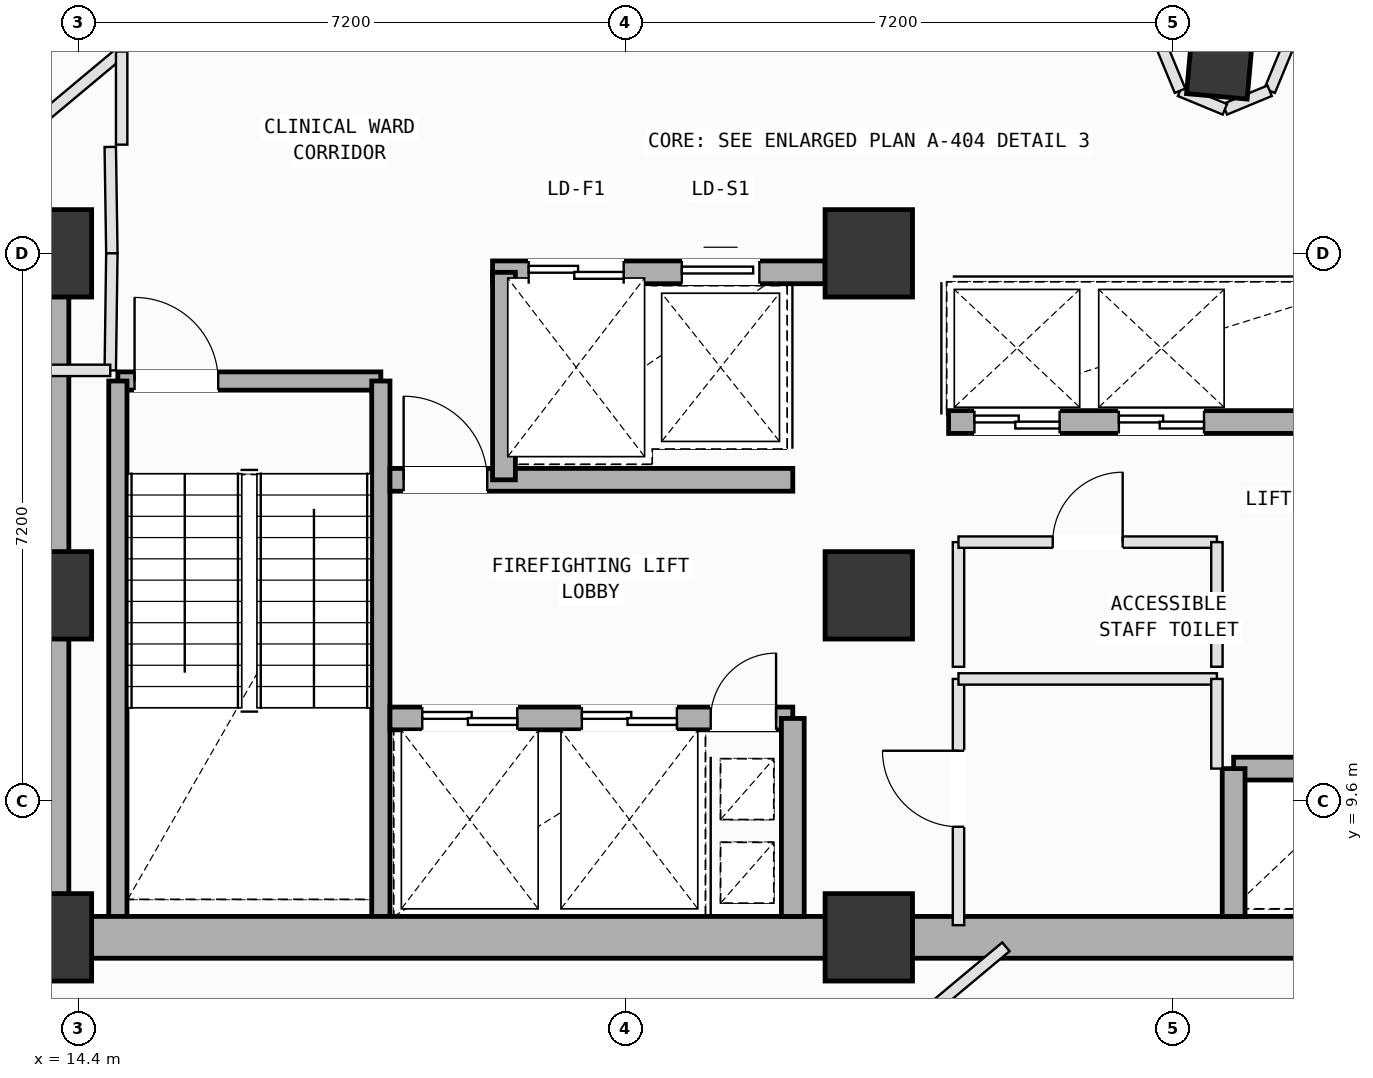
"""IFC4 building model, lengths in metres.
Left out: names, types, materials, properties, quantities, classifications, styles, units other than length and angle.
Written with IfcOpenShell. Run it as: python <this file> out.ifc"""

import sys

from ifc_helpers import new_model, si_unit, direction, frame, frame_2d, origin, origin_2d, place, context, subcontext, project, spatial, rectangle, extrude, element, fill, save


model = new_model("IFC4")
c1 = context("Model", 3, precision=1e-05, world=origin(), true_north=direction((0.0, 1.0)))
c2 = subcontext(c1, "Body", "Model", "MODEL_VIEW")
j1 = project(units=[si_unit("LENGTHUNIT", "METRE"), si_unit("PLANEANGLEUNIT", "RADIAN")], contexts=[c1])
p1 = place(None, origin())
s1 = spatial("IfcSite", under=j1, at=p1, CompositionType="ELEMENT")
p2 = place(p1, origin())
s2 = spatial("IfcBuilding", under=s1, at=p2, CompositionType="ELEMENT")
p3 = place(p2, frame((0.0, 0.0, 193.8)))
s3 = spatial("IfcBuildingStorey", under=s2, at=p3, CompositionType="ELEMENT", Elevation=193.8)
for number, where, z_axis, x_axis in (
    (1, (14.0, 7.8, 0.0), (0.0, 0.0, 1.0), (1.0, 0.0, 0.0)),
    (2, (14.0, 12.3, 0.0), (0.0, 0.0, 1.0), (1.0, 0.0, 0.0)),
    (3, (14.0, 16.8, 0.0), (0.0, 0.0, 1.0), (1.0, 0.0, 0.0)),
    (4, (24.8, 7.8, 0.0), (0.0, 0.0, 1.0), (1.0, 0.0, 0.0)),
    (5, (24.8, 12.3, 0.0), (0.0, 0.0, 1.0), (1.0, 0.0, 0.0)),
    (6, (24.8, 16.8, 0.0), (0.0, 0.0, 1.0), (1.0, 0.0, 0.0)),
):
    element("IfcColumn", number, at=place(p3, frame(where, z_axis=z_axis, x_axis=x_axis)), inside=s3, PredefinedType="COLUMN", context=c2, shape_type="SweptSolid", body=[
        extrude(rectangle(XDim=1.15, YDim=1.15, at=origin_2d()), origin(), (0.0, 0.0, 1.0), 4.0),
    ])
p4 = place(p3, frame((29.441, 19.563, 0.002), z_axis=(0.021801167922, -0.017037887535, 0.999617136441), x_axis=(-0.729765502986, 0.68314184463, 0.027559585755)))
e7 = element("IfcColumn", 7, at=p4, inside=s3, PredefinedType="COLUMN", context=c2, shape_type="SweptSolid", body=[
    extrude(rectangle(XDim=1.4, YDim=0.8, at=origin_2d()), origin(), (0.0, 0.0, 1.0), 3.998),
])
p5 = place(p3, frame((16.476, 2.487, 0.0), z_axis=(0.0, 0.0, 1.0), x_axis=(-0.641449443944, 0.767165308694, 0.0)))
e8 = element("IfcWall", 8, at=p5, inside=s3, PredefinedType="SOLIDWALL", context=c2, shape_type="SweptSolid", body=[
    extrude(rectangle(XDim=7.36, YDim=0.28, at=frame_2d((3.68, 0.0))), origin(), (0.0, 0.0, 1.0), 3.265),
])
p6 = place(p5, frame((1.888, 0.0, 0.75)))
e9 = element("IfcOpeningElement", 9, at=p6, cuts=e8, PredefinedType="OPENING", context=c2, shape_type="SweptSolid", body=[
    extrude(rectangle(XDim=1.8, YDim=2.05, at=frame_2d((0.9, 1.025))), frame((0.0, 0.15, 0.0), z_axis=(0.0, -1.0, 0.0), x_axis=(1.0, 0.0, 0.0)), (0.0, 0.0, 1.0), 0.3),
])
p7 = place(p3, frame((14.92, 15.12, 0.0), z_axis=(0.0, 0.0, 1.0), x_axis=(1.0, 0.0, 0.0)))
e10 = element("IfcWall", 10, at=p7, inside=s3, PredefinedType="SOLIDWALL", context=c2, shape_type="SweptSolid", body=[
    extrude(rectangle(XDim=3.46, YDim=0.24, at=frame_2d((1.73, 0.0))), origin(), (0.0, 0.0, 1.0), 3.78),
])
p8 = place(p7, frame((0.22, 0.0, 0.0)))
e11 = element("IfcOpeningElement", 11, at=p8, cuts=e10, PredefinedType="OPENING", context=c2, shape_type="SweptSolid", body=[
    extrude(rectangle(XDim=1.1, YDim=2.15, at=frame_2d((0.55, 1.075))), frame((0.0, 0.13, 0.0), z_axis=(0.0, -1.0, 0.0), x_axis=(1.0, 0.0, 0.0)), (0.0, 0.0, 1.0), 0.26),
])
for number, where, z_axis, x_axis in (
    (12, (18.38, 15.12, 0.0), (0.0, 0.0, 1.0), (0.0, -1.0, 0.0)),
    (13, (14.92, 8.075, 0.0), (0.0, 0.0, 1.0), (0.0, 1.0, 0.0)),
):
    element("IfcWall", number, at=place(p3, frame(where, z_axis=z_axis, x_axis=x_axis)), inside=s3, PredefinedType="SOLIDWALL", context=c2, shape_type="SweptSolid", body=[
        extrude(rectangle(XDim=7.045, YDim=0.24, at=frame_2d((3.522, 0.0))), origin(), (0.0, 0.0, 1.0), 3.78),
    ])
for number, where, z_axis, x_axis in (
    (14, (14.0, 7.8, 0.0), (0.0, 0.0, 1.0), (1.0, 0.0, 0.0)),
    (15, (24.8, 7.8, 0.0), (0.0, 0.0, 1.0), (1.0, 0.0, 0.0)),
):
    element("IfcWall", number, at=place(p3, frame(where, z_axis=z_axis, x_axis=x_axis)), inside=s3, PredefinedType="SHEAR", context=c2, shape_type="SweptSolid", body=[
        extrude(rectangle(XDim=10.8, YDim=0.55, at=frame_2d((5.4, 0.0))), origin(), (0.0, 0.0, 1.0), 3.78),
    ])
p9 = place(p3, frame((14.0, 16.8, 0.0), z_axis=(0.0, 0.0, 1.0), x_axis=(0.0, -1.0, 0.0)))
e16 = element("IfcWall", 16, at=p9, inside=s3, PredefinedType="SHEAR", context=c2, shape_type="SweptSolid", body=[
    extrude(rectangle(XDim=9.0, YDim=0.55, at=frame_2d((4.5, 0.0))), origin(), (0.0, 0.0, 1.0), 3.78),
])
p10 = place(p3, frame((19.85, 16.55, 0.0), z_axis=(0.0, 0.0, 1.0), x_axis=(1.0, 0.0, 0.0)))
e17 = element("IfcWall", 17, at=p10, inside=s3, PredefinedType="SOLIDWALL", context=c2, shape_type="SweptSolid", body=[
    extrude(rectangle(XDim=4.375, YDim=0.3, at=frame_2d((2.188, 0.0))), origin(), (0.0, 0.0, 1.0), 3.78),
])
p11 = place(p10, frame((0.475, 0.0, 0.0)))
e18 = element("IfcOpeningElement", 18, at=p11, cuts=e17, PredefinedType="OPENING", context=c2, shape_type="SweptSolid", body=[
    extrude(rectangle(XDim=1.25, YDim=2.18, at=frame_2d((0.625, 1.09))), frame((0.0, 0.16, 0.0), z_axis=(0.0, -1.0, 0.0), x_axis=(1.0, 0.0, 0.0)), (0.0, 0.0, 1.0), 0.32),
])
p12 = place(p10, frame((2.49, 0.0, 0.0)))
e19 = element("IfcOpeningElement", 19, at=p12, cuts=e17, PredefinedType="OPENING", context=c2, shape_type="SweptSolid", body=[
    extrude(rectangle(XDim=1.02, YDim=2.12, at=frame_2d((0.51, 1.06))), frame((0.0, 0.16, 0.0), z_axis=(0.0, -1.0, 0.0), x_axis=(1.0, 0.0, 0.0)), (0.0, 0.0, 1.0), 0.32),
])
p13 = place(p3, frame((18.5, 10.68, 0.0), z_axis=(0.0, 0.0, 1.0), x_axis=(1.0, 0.0, 0.0)))
e20 = element("IfcWall", 20, at=p13, inside=s3, PredefinedType="SOLIDWALL", context=c2, shape_type="SweptSolid", body=[
    extrude(rectangle(XDim=5.3, YDim=0.3, at=frame_2d((2.65, 0.0))), origin(), (0.0, 0.0, 1.0), 3.78),
])
p14 = place(p13, frame((4.22, 0.0, 0.0)))
e21 = element("IfcOpeningElement", 21, at=p14, cuts=e20, PredefinedType="OPENING", context=c2, shape_type="SweptSolid", body=[
    extrude(rectangle(XDim=0.86, YDim=2.06, at=frame_2d((0.43, 1.03))), frame((0.0, 0.16, 0.0), z_axis=(0.0, -1.0, 0.0), x_axis=(1.0, 0.0, 0.0)), (0.0, 0.0, 1.0), 0.32),
])
p15 = place(p13, frame((0.425, 0.0, 0.0)))
e22 = element("IfcOpeningElement", 22, at=p15, cuts=e20, PredefinedType="OPENING", context=c2, shape_type="SweptSolid", body=[
    extrude(rectangle(XDim=1.25, YDim=2.18, at=frame_2d((0.625, 1.09))), frame((0.0, 0.16, 0.0), z_axis=(0.0, -1.0, 0.0), x_axis=(1.0, 0.0, 0.0)), (0.0, 0.0, 1.0), 0.32),
])
p16 = place(p13, frame((2.525, 0.0, 0.0)))
e23 = element("IfcOpeningElement", 23, at=p16, cuts=e20, PredefinedType="OPENING", context=c2, shape_type="SweptSolid", body=[
    extrude(rectangle(XDim=1.25, YDim=2.18, at=frame_2d((0.625, 1.09))), frame((0.0, 0.16, 0.0), z_axis=(0.0, -1.0, 0.0), x_axis=(1.0, 0.0, 0.0)), (0.0, 0.0, 1.0), 0.32),
])
p17 = place(p3, frame((18.5, 13.82, 0.0), z_axis=(0.0, 0.0, 1.0), x_axis=(1.0, 0.0, 0.0)))
e24 = element("IfcWall", 24, at=p17, inside=s3, PredefinedType="SOLIDWALL", context=c2, shape_type="SweptSolid", body=[
    extrude(rectangle(XDim=5.3, YDim=0.3, at=frame_2d((2.65, 0.0))), origin(), (0.0, 0.0, 1.0), 3.78),
])
p18 = place(p17, frame((0.18, 0.0, 0.0)))
e25 = element("IfcOpeningElement", 25, at=p18, cuts=e24, PredefinedType="OPENING", context=c2, shape_type="SweptSolid", body=[
    extrude(rectangle(XDim=1.1, YDim=2.15, at=frame_2d((0.55, 1.075))), frame((0.0, 0.16, 0.0), z_axis=(0.0, -1.0, 0.0), x_axis=(1.0, 0.0, 0.0)), (0.0, 0.0, 1.0), 0.32),
])
p19 = place(p3, frame((23.8, 8.075, 0.0), z_axis=(0.0, 0.0, 1.0), x_axis=(0.0, 1.0, 0.0)))
e26 = element("IfcWall", 26, at=p19, inside=s3, PredefinedType="SOLIDWALL", context=c2, shape_type="SweptSolid", body=[
    extrude(rectangle(XDim=2.605, YDim=0.3, at=frame_2d((1.302, 0.0))), origin(), (0.0, 0.0, 1.0), 3.78),
])
p20 = place(p3, frame((20.0, 13.82, 0.0), z_axis=(0.0, 0.0, 1.0), x_axis=(0.0, 1.0, 0.0)))
e27 = element("IfcWall", 27, at=p20, inside=s3, PredefinedType="SOLIDWALL", context=c2, shape_type="SweptSolid", body=[
    extrude(rectangle(XDim=2.73, YDim=0.3, at=frame_2d((1.365, 0.0))), origin(), (0.0, 0.0, 1.0), 3.78),
])
p21 = place(p3, frame((29.6, 10.02, 0.0), z_axis=(0.0, 0.0, 1.0), x_axis=(1.0, 0.0, 0.0)))
e28 = element("IfcWall", 28, at=p21, inside=s3, PredefinedType="SOLIDWALL", context=c2, shape_type="SweptSolid", body=[
    extrude(rectangle(XDim=1.7, YDim=0.3, at=frame_2d((0.85, 0.0))), origin(), (0.0, 0.0, 1.0), 3.78),
])
p22 = place(p3, frame((29.6, 8.075, 0.0), z_axis=(0.0, 0.0, 1.0), x_axis=(0.0, 1.0, 0.0)))
e29 = element("IfcWall", 29, at=p22, inside=s3, PredefinedType="SOLIDWALL", context=c2, shape_type="SweptSolid", body=[
    extrude(rectangle(XDim=1.945, YDim=0.3, at=frame_2d((0.973, 0.0))), origin(), (0.0, 0.0, 1.0), 3.78),
])
p23 = place(p3, frame((25.85, 14.58, 0.0), z_axis=(0.0, 0.0, 1.0), x_axis=(1.0, 0.0, 0.0)))
e30 = element("IfcWall", 30, at=p23, inside=s3, PredefinedType="SOLIDWALL", context=c2, shape_type="SweptSolid", body=[
    extrude(rectangle(XDim=5.45, YDim=0.3, at=frame_2d((2.725, 0.0))), origin(), (0.0, 0.0, 1.0), 3.78),
])
p24 = place(p23, frame((0.34, 0.0, 0.0)))
e31 = element("IfcOpeningElement", 31, at=p24, cuts=e30, PredefinedType="OPENING", context=c2, shape_type="SweptSolid", body=[
    extrude(rectangle(XDim=1.12, YDim=2.15, at=frame_2d((0.56, 1.075))), frame((0.0, 0.16, 0.0), z_axis=(0.0, -1.0, 0.0), x_axis=(1.0, 0.0, 0.0)), (0.0, 0.0, 1.0), 0.32),
])
p25 = place(p23, frame((2.24, 0.0, 0.0)))
e32 = element("IfcOpeningElement", 32, at=p25, cuts=e30, PredefinedType="OPENING", context=c2, shape_type="SweptSolid", body=[
    extrude(rectangle(XDim=1.12, YDim=2.15, at=frame_2d((0.56, 1.075))), frame((0.0, 0.16, 0.0), z_axis=(0.0, -1.0, 0.0), x_axis=(1.0, 0.0, 0.0)), (0.0, 0.0, 1.0), 0.32),
])
p26 = place(p3, frame((25.98, 7.96, 0.0), z_axis=(0.0, 0.0, 1.0), x_axis=(0.0, 1.0, 0.0)))
e33 = element("IfcWall", 33, at=p26, inside=s3, PredefinedType="PARTITIONING", context=c2, shape_type="SweptSolid", body=[
    extrude(rectangle(XDim=3.24, YDim=0.15, at=frame_2d((1.62, 0.0))), origin(), (0.0, 0.0, 1.0), 3.78),
])
p27 = place(p26, frame((1.295, 0.0, 0.0)))
e34 = element("IfcOpeningElement", 34, at=p27, cuts=e33, PredefinedType="OPENING", context=c2, shape_type="SweptSolid", body=[
    extrude(rectangle(XDim=1.0, YDim=2.12, at=frame_2d((0.5, 1.06))), frame((0.0, 0.085, 0.0), z_axis=(0.0, -1.0, 0.0), x_axis=(1.0, 0.0, 0.0)), (0.0, 0.0, 1.0), 0.17),
])
p28 = place(p3, frame((25.98, 11.2, 0.0), z_axis=(0.0, 0.0, 1.0), x_axis=(1.0, 0.0, 0.0)))
e35 = element("IfcWall", 35, at=p28, inside=s3, PredefinedType="PARTITIONING", context=c2, shape_type="SweptSolid", body=[
    extrude(rectangle(XDim=3.4, YDim=0.15, at=frame_2d((1.7, 0.0))), origin(), (0.0, 0.0, 1.0), 3.78),
])
p29 = place(p3, frame((29.38, 11.2, 0.0), z_axis=(0.0, 0.0, 1.0), x_axis=(0.0, -1.0, 0.0)))
e36 = element("IfcWall", 36, at=p29, inside=s3, PredefinedType="PARTITIONING", context=c2, shape_type="SweptSolid", body=[
    extrude(rectangle(XDim=1.18, YDim=0.15, at=frame_2d((0.59, 0.0))), origin(), (0.0, 0.0, 1.0), 3.78),
])
p30 = place(p3, frame((25.98, 11.36, 0.0), z_axis=(0.0, 0.0, 1.0), x_axis=(0.0, 1.0, 0.0)))
e37 = element("IfcWall", 37, at=p30, inside=s3, PredefinedType="PARTITIONING", context=c2, shape_type="SweptSolid", body=[
    extrude(rectangle(XDim=1.64, YDim=0.15, at=frame_2d((0.82, 0.0))), origin(), (0.0, 0.0, 1.0), 3.78),
])
p31 = place(p3, frame((25.98, 13.0, 0.0), z_axis=(0.0, 0.0, 1.0), x_axis=(1.0, 0.0, 0.0)))
e38 = element("IfcWall", 38, at=p31, inside=s3, PredefinedType="PARTITIONING", context=c2, shape_type="SweptSolid", body=[
    extrude(rectangle(XDim=3.4, YDim=0.15, at=frame_2d((1.7, 0.0))), origin(), (0.0, 0.0, 1.0), 3.78),
])
p32 = place(p31, frame((1.24, 0.0, 0.0)))
e39 = element("IfcOpeningElement", 39, at=p32, cuts=e38, PredefinedType="OPENING", context=c2, shape_type="SweptSolid", body=[
    extrude(rectangle(XDim=0.92, YDim=2.1, at=frame_2d((0.46, 1.05))), frame((0.0, 0.085, 0.0), z_axis=(0.0, -1.0, 0.0), x_axis=(1.0, 0.0, 0.0)), (0.0, 0.0, 1.0), 0.17),
])
p33 = place(p3, frame((29.38, 13.0, 0.0), z_axis=(0.0, 0.0, 1.0), x_axis=(0.0, -1.0, 0.0)))
e40 = element("IfcWall", 40, at=p33, inside=s3, PredefinedType="PARTITIONING", context=c2, shape_type="SweptSolid", body=[
    extrude(rectangle(XDim=1.64, YDim=0.15, at=frame_2d((0.82, 0.0))), origin(), (0.0, 0.0, 1.0), 3.78),
])
p34 = place(p3, frame((23.959, 5.463, 0.0), z_axis=(0.0, 0.0, 1.0), x_axis=(0.767082571844, 0.64154838319, 0.0)))
e41 = element("IfcWall", 41, at=p34, inside=s3, PredefinedType="PARTITIONING", context=c2, shape_type="SweptSolid", body=[
    extrude(rectangle(XDim=3.448, YDim=0.15, at=frame_2d((1.724, 0.0))), origin(), (0.0, 0.0, 1.0), 3.78),
])
p35 = place(p3, frame((14.82, 18.2, 0.0), z_axis=(0.0, 0.0, 1.0), x_axis=(0.01499656939, -0.99988754513, 0.0)))
e42 = element("IfcWall", 42, at=p35, inside=s3, PredefinedType="PARTITIONING", context=c2, shape_type="SweptSolid", body=[
    extrude(rectangle(XDim=1.4, YDim=0.15, at=frame_2d((0.7, 0.0))), origin(), (0.0, 0.0, 1.0), 3.78),
])
p36 = place(p3, frame((14.841, 16.8, 0.0), z_axis=(0.0, 0.0, 1.0), x_axis=(-0.01363221443, -0.999907077048, 0.0)))
e43 = element("IfcWall", 43, at=p36, inside=s3, PredefinedType="PARTITIONING", context=c2, shape_type="SweptSolid", body=[
    extrude(rectangle(XDim=1.54, YDim=0.15, at=frame_2d((0.77, 0.0))), origin(), (0.0, 0.0, 1.0), 3.78),
])
p37 = place(p3, frame((14.82, 15.26, 0.0), z_axis=(0.0, 0.0, 1.0), x_axis=(-1.0, 0.0, 0.0)))
e44 = element("IfcWall", 44, at=p37, inside=s3, PredefinedType="PARTITIONING", context=c2, shape_type="SweptSolid", body=[
    extrude(rectangle(XDim=1.12, YDim=0.15, at=frame_2d((0.56, 0.0))), origin(), (0.0, 0.0, 1.0), 3.78),
])
p38 = place(p3, frame((7.594, 13.289, 0.0), z_axis=(0.0, 0.0, 1.0), x_axis=(0.767229543611, 0.64137261199, 0.0)))
e45 = element("IfcWall", 45, at=p38, inside=s3, PredefinedType="PARTITIONING", context=c2, shape_type="SweptSolid", body=[
    extrude(rectangle(XDim=9.614, YDim=0.15, at=frame_2d((4.807, 0.0))), origin(), (0.0, 0.0, 1.0), 3.78),
])
p39 = place(p38, frame((4.377, 0.0, 0.0)))
e46 = element("IfcOpeningElement", 46, at=p39, cuts=e45, PredefinedType="OPENING", context=c2, shape_type="SweptSolid", body=[
    extrude(rectangle(XDim=0.86, YDim=2.06, at=frame_2d((0.43, 1.03))), frame((0.0, 0.085, 0.0), z_axis=(0.0, -1.0, 0.0), x_axis=(1.0, 0.0, 0.0)), (0.0, 0.0, 1.0), 0.17),
])
p40 = place(p3, frame((14.97, 19.455, 0.0), z_axis=(0.0, 0.0, 1.0), x_axis=(0.0, -1.0, 0.0)))
e47 = element("IfcWall", 47, at=p40, inside=s3, PredefinedType="PARTITIONING", context=c2, shape_type="SweptSolid", body=[
    extrude(rectangle(XDim=1.225, YDim=0.15, at=frame_2d((0.613, 0.0))), origin(), (0.0, 0.0, 1.0), 3.78),
])
p41 = place(p3, frame((30.318, 19.529, 0.0), z_axis=(0.0, 0.0, 1.0), x_axis=(-0.382306769343, -0.924035461503, 0.0)))
e48 = element("IfcWall", 48, at=p41, inside=s3, PredefinedType="PARTITIONING", context=c2, shape_type="SweptSolid", body=[
    extrude(rectangle(XDim=0.639, YDim=0.15, at=frame_2d((0.319, 0.0))), origin(), (0.0, 0.0, 1.0), 3.78),
])
p42 = place(p3, frame((30.074, 18.939, 0.0), z_axis=(0.0, 0.0, 1.0), x_axis=(-0.923890787601, -0.382656259044, 0.0)))
e49 = element("IfcWall", 49, at=p42, inside=s3, PredefinedType="PARTITIONING", context=c2, shape_type="SweptSolid", body=[
    extrude(rectangle(XDim=0.637, YDim=0.15, at=frame_2d((0.319, 0.0))), origin(), (0.0, 0.0, 1.0), 3.78),
])
p43 = place(p3, frame((29.485, 18.695, 0.0), z_axis=(0.0, 0.0, 1.0), x_axis=(-0.924170479167, 0.381980268386, 0.0)))
e50 = element("IfcWall", 50, at=p43, inside=s3, PredefinedType="PARTITIONING", context=c2, shape_type="SweptSolid", body=[
    extrude(rectangle(XDim=0.638, YDim=0.15, at=frame_2d((0.319, 0.0))), origin(), (0.0, 0.0, 1.0), 3.78),
])
p44 = place(p3, frame((28.895, 18.939, 0.0), z_axis=(0.0, 0.0, 1.0), x_axis=(-0.382306769343, 0.924035461503, 0.0)))
e51 = element("IfcWall", 51, at=p44, inside=s3, PredefinedType="PARTITIONING", context=c2, shape_type="SweptSolid", body=[
    extrude(rectangle(XDim=0.639, YDim=0.15, at=frame_2d((0.319, 0.0))), origin(), (0.0, 0.0, 1.0), 3.78),
])
p45 = place(p8, origin())
e52 = element("IfcDoor", 52, at=p45, inside=s3, OperationType="SINGLE_SWING_LEFT", PredefinedType="DOOR", context=c2, shape_type="SweptSolid", body=[
    extrude(rectangle(XDim=1.1, YDim=2.15, at=frame_2d((0.55, 1.075))), frame((0.0, 0.025, 0.0), z_axis=(0.0, -1.0, 0.0), x_axis=(1.0, 0.0, 0.0)), (0.0, 0.0, 1.0), 0.05),
])
fill(e11, e52)
p46 = place(p14, origin())
e53 = element("IfcDoor", 53, at=p46, inside=s3, OperationType="SINGLE_SWING_RIGHT", PredefinedType="DOOR", context=c2, shape_type="SweptSolid", body=[
    extrude(rectangle(XDim=0.86, YDim=2.06, at=frame_2d((0.43, 1.03))), frame((0.0, 0.025, 0.0), z_axis=(0.0, -1.0, 0.0), x_axis=(1.0, 0.0, 0.0)), (0.0, 0.0, 1.0), 0.05),
])
fill(e21, e53)
p47 = place(p18, origin())
e54 = element("IfcDoor", 54, at=p47, inside=s3, OperationType="SINGLE_SWING_LEFT", PredefinedType="DOOR", context=c2, shape_type="SweptSolid", body=[
    extrude(rectangle(XDim=1.1, YDim=2.15, at=frame_2d((0.55, 1.075))), frame((0.0, 0.025, 0.0), z_axis=(0.0, -1.0, 0.0), x_axis=(1.0, 0.0, 0.0)), (0.0, 0.0, 1.0), 0.05),
])
fill(e25, e54)
p48 = place(p15, origin())
e55 = element("IfcDoor", 55, at=p48, inside=s3, OperationType="DOUBLE_DOOR_SLIDING", PredefinedType="DOOR", context=c2, shape_type="SweptSolid", body=[
    extrude(rectangle(XDim=1.25, YDim=2.18, at=frame_2d((0.625, 1.09))), frame((0.0, 0.025, 0.0), z_axis=(0.0, -1.0, 0.0), x_axis=(1.0, 0.0, 0.0)), (0.0, 0.0, 1.0), 0.05),
])
fill(e22, e55)
p49 = place(p16, origin())
e56 = element("IfcDoor", 56, at=p49, inside=s3, OperationType="DOUBLE_DOOR_SLIDING", PredefinedType="DOOR", context=c2, shape_type="SweptSolid", body=[
    extrude(rectangle(XDim=1.25, YDim=2.18, at=frame_2d((0.625, 1.09))), frame((0.0, 0.025, 0.0), z_axis=(0.0, -1.0, 0.0), x_axis=(1.0, 0.0, 0.0)), (0.0, 0.0, 1.0), 0.05),
])
fill(e23, e56)
p50 = place(p24, origin())
e57 = element("IfcDoor", 57, at=p50, inside=s3, OperationType="DOUBLE_DOOR_SLIDING", PredefinedType="DOOR", context=c2, shape_type="SweptSolid", body=[
    extrude(rectangle(XDim=1.12, YDim=2.15, at=frame_2d((0.56, 1.075))), frame((0.0, 0.025, 0.0), z_axis=(0.0, -1.0, 0.0), x_axis=(1.0, 0.0, 0.0)), (0.0, 0.0, 1.0), 0.05),
])
fill(e31, e57)
p51 = place(p25, origin())
e58 = element("IfcDoor", 58, at=p51, inside=s3, OperationType="DOUBLE_DOOR_SLIDING", PredefinedType="DOOR", context=c2, shape_type="SweptSolid", body=[
    extrude(rectangle(XDim=1.12, YDim=2.15, at=frame_2d((0.56, 1.075))), frame((0.0, 0.025, 0.0), z_axis=(0.0, -1.0, 0.0), x_axis=(1.0, 0.0, 0.0)), (0.0, 0.0, 1.0), 0.05),
])
fill(e32, e58)
p52 = place(p11, origin())
e59 = element("IfcDoor", 59, at=p52, inside=s3, OperationType="DOUBLE_DOOR_SLIDING", PredefinedType="DOOR", context=c2, shape_type="SweptSolid", body=[
    extrude(rectangle(XDim=1.25, YDim=2.18, at=frame_2d((0.625, 1.09))), frame((0.0, 0.025, 0.0), z_axis=(0.0, -1.0, 0.0), x_axis=(1.0, 0.0, 0.0)), (0.0, 0.0, 1.0), 0.05),
])
fill(e18, e59)
p53 = place(p12, origin())
e60 = element("IfcDoor", 60, at=p53, inside=s3, OperationType="SLIDING_TO_LEFT", PredefinedType="DOOR", context=c2, shape_type="SweptSolid", body=[
    extrude(rectangle(XDim=1.02, YDim=2.12, at=frame_2d((0.51, 1.06))), frame((0.0, 0.025, 0.0), z_axis=(0.0, -1.0, 0.0), x_axis=(1.0, 0.0, 0.0)), (0.0, 0.0, 1.0), 0.05),
])
fill(e19, e60)
p54 = place(p27, origin())
e61 = element("IfcDoor", 61, at=p54, inside=s3, OperationType="SINGLE_SWING_RIGHT", PredefinedType="DOOR", context=c2, shape_type="SweptSolid", body=[
    extrude(rectangle(XDim=1.0, YDim=2.12, at=frame_2d((0.5, 1.06))), frame((0.0, 0.025, 0.0), z_axis=(0.0, -1.0, 0.0), x_axis=(1.0, 0.0, 0.0)), (0.0, 0.0, 1.0), 0.05),
])
fill(e34, e61)
p55 = place(p32, origin())
e62 = element("IfcDoor", 62, at=p55, inside=s3, OperationType="SINGLE_SWING_RIGHT", PredefinedType="DOOR", context=c2, shape_type="SweptSolid", body=[
    extrude(rectangle(XDim=0.92, YDim=2.1, at=frame_2d((0.46, 1.05))), frame((0.0, 0.025, 0.0), z_axis=(0.0, -1.0, 0.0), x_axis=(1.0, 0.0, 0.0)), (0.0, 0.0, 1.0), 0.05),
])
fill(e39, e62)
save(model, sys.argv[1])
